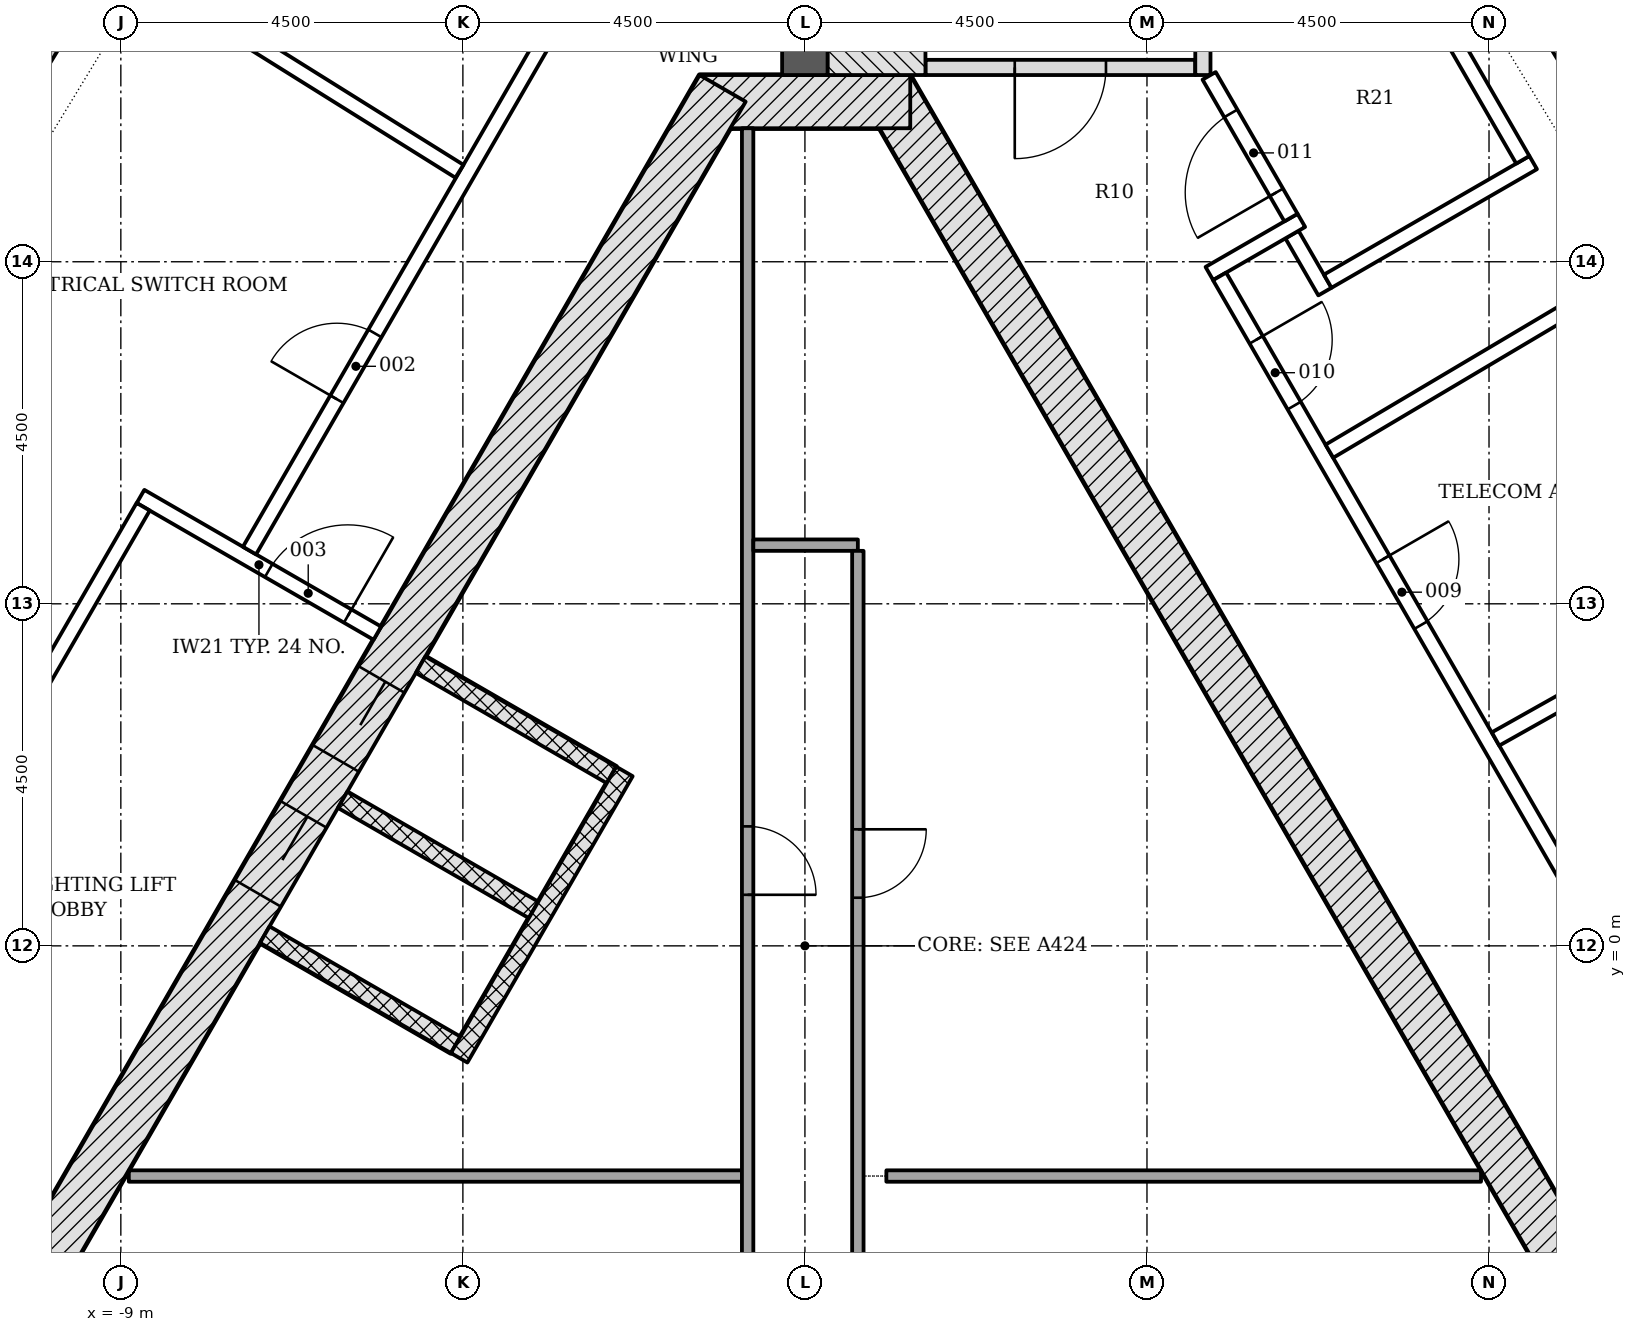
"""IFC4 building model, lengths in metres.
Left out: names, types, materials, properties, quantities, classifications, styles, units other than length and angle.
Written with IfcOpenShell. Run it as: python <this file> out.ifc"""

import sys

from ifc_helpers import new_model, si_unit, direction, frame, frame_2d, origin, place, context, subcontext, project, spatial, polyline, rectangle, outline, extrude, element, fill, save


model = new_model("IFC4")
c1 = context("Model", 3, precision=1e-05, world=origin(), true_north=direction((0.0, 1.0)))
c2 = subcontext(c1, "Body", "Model", "MODEL_VIEW")
j1 = project(units=[si_unit("LENGTHUNIT", "METRE"), si_unit("PLANEANGLEUNIT", "RADIAN")], contexts=[c1])
p1 = place(None, origin())
s1 = spatial("IfcSite", under=j1, at=p1, CompositionType="ELEMENT")
p2 = place(p1, origin())
s2 = spatial("IfcBuilding", under=s1, at=p2, CompositionType="ELEMENT")
p3 = place(p2, frame((0.0, 0.0, 302.1)))
s3 = spatial("IfcBuildingStorey", under=s2, at=p3, CompositionType="ELEMENT", Elevation=302.1)
p4 = place(p3, frame((10.311, -4.703, -0.25), z_axis=(0.0, 0.0, 1.0), x_axis=(-0.500001446645, 0.866024568562, 0.0)))
e1 = element("IfcWall", 1, at=p4, inside=s3, PredefinedType="SHEAR", context=c2, shape_type="SweptSolid", body=[
    extrude(rectangle(XDim=18.458, YDim=0.7, at=frame_2d((9.229, 0.0))), origin(), (0.0, 0.0, 1.0), 4.5),
])
p5 = place(p3, frame((1.386, 11.106, -0.25), z_axis=(0.0, 0.0, 1.0), x_axis=(-1.0, 0.0, 0.0)))
e2 = element("IfcWall", 2, at=p5, inside=s3, PredefinedType="SHEAR", context=c2, shape_type="SweptSolid", body=[
    extrude(rectangle(XDim=2.771, YDim=0.7, at=frame_2d((1.386, 0.0))), origin(), (0.0, 0.0, 1.0), 4.5),
])
p6 = place(p3, frame((-1.083, 11.281, -0.25), z_axis=(0.0, 0.0, 1.0), x_axis=(-0.500001446645, -0.866024568562, 0.0)))
e3 = element("IfcWall", 3, at=p6, inside=s3, PredefinedType="SHEAR", context=c2, shape_type="SweptSolid", body=[
    extrude(rectangle(XDim=18.458, YDim=0.7, at=frame_2d((9.229, 0.0))), origin(), (0.0, 0.0, 1.0), 4.5),
])
p7 = place(p6, frame((8.979, 0.0, 0.25)))
e4 = element("IfcOpeningElement", 4, at=p7, cuts=e3, PredefinedType="OPENING", context=c2, shape_type="SweptSolid", body=[
    extrude(rectangle(XDim=1.2, YDim=2.1, at=frame_2d((0.6, 1.05))), frame((0.0, 0.36, 0.0), z_axis=(0.0, -1.0, 0.0), x_axis=(1.0, 0.0, 0.0)), (0.0, 0.0, 1.0), 0.72),
])
p8 = place(p6, frame((11.029, 0.0, 0.25)))
e5 = element("IfcOpeningElement", 5, at=p8, cuts=e3, PredefinedType="OPENING", context=c2, shape_type="SweptSolid", body=[
    extrude(rectangle(XDim=1.2, YDim=2.1, at=frame_2d((0.6, 1.05))), frame((0.0, 0.36, 0.0), z_axis=(0.0, -1.0, 0.0), x_axis=(1.0, 0.0, 0.0)), (0.0, 0.0, 1.0), 0.72),
])
p9 = place(p3, frame((0.0, 11.456, -0.25), z_axis=(0.0, 0.0, 1.0), x_axis=(0.0, 1.0, 0.0)))
e6 = element("IfcWall", 6, at=p9, inside=s3, PredefinedType="SHEAR", context=c2, shape_type="SweptSolid", body=[
    extrude(rectangle(XDim=6.679, YDim=0.6, at=frame_2d((3.339, 0.0))), origin(), (0.0, 0.0, 1.0), 4.5),
])
p10 = place(p3, origin())
e7 = element("IfcWall", 7, at=p10, inside=s3, PredefinedType="NOTDEFINED", context=c2, shape_type="SweptSolid", body=[
    extrude(outline(polyline([(-6.901, 16.968), (-9.33, 13.179), (-11.669, 9.335), (-11.413, 9.179), (-9.075, 13.02), (-6.649, 16.806), (-6.901, 16.968)])), origin(), (0.0, 0.0, 1.0), 4.25),
])
p11 = place(p3, origin())
e8 = element("IfcWall", 8, at=p11, inside=s3, PredefinedType="NOTDEFINED", context=c2, shape_type="SweptSolid", body=[
    extrude(outline(polyline([(11.669, 9.335), (9.33, 13.179), (6.901, 16.968), (6.649, 16.806), (9.075, 13.02), (11.413, 9.179), (11.669, 9.335)])), origin(), (0.0, 0.0, 1.0), 4.25),
])
for number, where, z_axis, x_axis in (
    (9, (-5.056, 3.699, -0.25), (0.0, 0.0, 1.0), (0.866, -0.5, 0.0)),
    (10, (-6.081, 1.923, -0.25), (0.0, 0.0, 1.0), (0.866, -0.5, 0.0)),
    (11, (-7.106, 0.148, -0.25), (0.0, 0.0, 1.0), (0.866, -0.5, 0.0)),
):
    element("IfcWall", number, at=place(p3, frame(where, z_axis=z_axis, x_axis=x_axis)), inside=s3, PredefinedType="PARTITIONING", context=c2, shape_type="SweptSolid", body=[
        extrude(rectangle(XDim=2.9, YDim=0.25, at=frame_2d((1.45, 0.0))), origin(), (0.0, 0.0, 1.0), 4.5),
    ])
p12 = place(p3, frame((-2.374, 2.294, 0.0), z_axis=(0.0, 0.0, 1.0), x_axis=(-0.499996127374, -0.866027639635, 0.0)))
e12 = element("IfcWall", 12, at=p12, inside=s3, PredefinedType="PARTITIONING", context=c2, shape_type="SweptSolid", body=[
    extrude(rectangle(XDim=4.35, YDim=0.25, at=frame_2d((2.175, 0.0))), origin(), (0.0, 0.0, 1.0), 4.25),
])
p13 = place(p3, frame((-8.895, -3.028, 0.0), z_axis=(0.0, 0.0, 1.0), x_axis=(1.0, 0.0, 0.0)))
e13 = element("IfcWall", 13, at=p13, inside=s3, PredefinedType="PARTITIONING", context=c2, shape_type="SweptSolid", body=[
    extrude(rectangle(XDim=8.066, YDim=0.15, at=frame_2d((4.033, 0.0))), origin(), (0.0, 0.0, 1.0), 4.25),
])
p14 = place(p3, frame((-0.754, 10.756, 0.0), z_axis=(0.0, 0.0, 1.0), x_axis=(0.0, -1.0, 0.0)))
e14 = element("IfcWall", 14, at=p14, inside=s3, PredefinedType="PARTITIONING", context=c2, shape_type="SweptSolid", body=[
    extrude(rectangle(XDim=16.985, YDim=0.15, at=frame_2d((8.492, 0.0))), origin(), (0.0, 0.0, 1.0), 4.25),
])
p15 = place(p14, frame((9.185, 0.0, 0.0)))
e15 = element("IfcOpeningElement", 15, at=p15, cuts=e14, PredefinedType="OPENING", context=c2, shape_type="SweptSolid", body=[
    extrude(rectangle(XDim=0.9, YDim=2.1, at=frame_2d((0.45, 1.05))), frame((0.0, 0.085, 0.0), z_axis=(0.0, -1.0, 0.0), x_axis=(1.0, 0.0, 0.0)), (0.0, 0.0, 1.0), 0.17),
])
p16 = place(p3, frame((-0.679, 5.272, 0.0), z_axis=(0.0, 0.0, 1.0), x_axis=(1.0, 0.0, 0.0)))
e16 = element("IfcWall", 16, at=p16, inside=s3, PredefinedType="PARTITIONING", context=c2, shape_type="SweptSolid", body=[
    extrude(rectangle(XDim=1.375, YDim=0.15, at=frame_2d((0.688, 0.0))), origin(), (0.0, 0.0, 1.0), 4.25),
])
p17 = place(p3, frame((0.696, 5.197, 0.0), z_axis=(0.0, 0.0, 1.0), x_axis=(0.0, -1.0, 0.0)))
e17 = element("IfcWall", 17, at=p17, inside=s3, PredefinedType="PARTITIONING", context=c2, shape_type="SweptSolid", body=[
    extrude(rectangle(XDim=11.425, YDim=0.15, at=frame_2d((5.712, 0.0))), origin(), (0.0, 0.0, 1.0), 4.25),
])
p18 = place(p17, frame((3.664, 0.0, 0.0)))
e18 = element("IfcOpeningElement", 18, at=p18, cuts=e17, PredefinedType="OPENING", context=c2, shape_type="SweptSolid", body=[
    extrude(rectangle(XDim=0.9, YDim=2.1, at=frame_2d((0.45, 1.05))), frame((0.0, 0.085, 0.0), z_axis=(0.0, -1.0, 0.0), x_axis=(1.0, 0.0, 0.0)), (0.0, 0.0, 1.0), 0.17),
])
p19 = place(p3, frame((1.071, -3.028, 0.0), z_axis=(0.0, 0.0, 1.0), x_axis=(1.0, 0.0, 0.0)))
e19 = element("IfcWall", 19, at=p19, inside=s3, PredefinedType="PARTITIONING", context=c2, shape_type="SweptSolid", body=[
    extrude(rectangle(XDim=7.824, YDim=0.15, at=frame_2d((3.912, 0.0))), origin(), (0.0, 0.0, 1.0), 4.25),
])
p20 = place(p3, frame((5.135, 11.556, -0.25), z_axis=(0.0, 0.0, 1.0), x_axis=(-1.0, 0.0, 0.0)))
e20 = element("IfcWall", 20, at=p20, inside=s3, PredefinedType="SHEAR", context=c2, shape_type="SweptSolid", body=[
    extrude(rectangle(XDim=3.55, YDim=0.2, at=frame_2d((1.775, 0.0))), origin(), (0.0, 0.0, 1.0), 4.5),
])
p21 = place(p20, frame((1.175, 0.0, 0.25)))
e21 = element("IfcOpeningElement", 21, at=p21, cuts=e20, PredefinedType="OPENING", context=c2, shape_type="SweptSolid", body=[
    extrude(rectangle(XDim=1.2, YDim=2.1, at=frame_2d((0.6, 1.05))), frame((0.0, 0.11, 0.0), z_axis=(0.0, -1.0, 0.0), x_axis=(1.0, 0.0, 0.0)), (0.0, 0.0, 1.0), 0.22),
])
p22 = place(p3, frame((5.236, 11.456, -0.25), z_axis=(0.0, 0.0, 1.0), x_axis=(0.0, 1.0, 0.0)))
e22 = element("IfcWall", 22, at=p22, inside=s3, PredefinedType="SHEAR", context=c2, shape_type="SweptSolid", body=[
    extrude(rectangle(XDim=5.6, YDim=0.2, at=frame_2d((2.8, 0.0))), origin(), (0.0, 0.0, 1.0), 4.5),
])
p23 = place(p22, frame((0.45, 0.0, 0.25)))
e23 = element("IfcOpeningElement", 23, at=p23, cuts=e22, PredefinedType="OPENING", context=c2, shape_type="SweptSolid", body=[
    extrude(rectangle(XDim=1.2, YDim=2.1, at=frame_2d((0.6, 1.05))), frame((0.0, 0.11, 0.0), z_axis=(0.0, -1.0, 0.0), x_axis=(1.0, 0.0, 0.0)), (0.0, 0.0, 1.0), 0.22),
])
p24 = place(p3, frame((0.943, 11.456, -0.25), z_axis=(0.0, 0.0, 1.0), x_axis=(0.0, 1.0, 0.0)))
e24 = element("IfcWall", 24, at=p24, inside=s3, PredefinedType="SHEAR", context=c2, shape_type="SweptSolid", body=[
    extrude(rectangle(XDim=6.679, YDim=1.286, at=frame_2d((3.339, 0.0))), origin(), (0.0, 0.0, 1.0), 4.5),
])
p25 = place(p3, frame((-8.741, 5.913, 0.0), z_axis=(0.0, 0.0, 1.0), x_axis=(0.866017220491, -0.500014173611, 0.0)))
e25 = element("IfcWall", 25, at=p25, inside=s3, PredefinedType="PARTITIONING", context=c2, shape_type="SweptSolid", body=[
    extrude(rectangle(XDim=3.598, YDim=0.2, at=frame_2d((1.799, 0.0))), origin(), (0.0, 0.0, 1.0), 4.25),
])
p26 = place(p25, frame((1.948, 0.0, 0.0)))
e26 = element("IfcOpeningElement", 26, at=p26, cuts=e25, PredefinedType="OPENING", context=c2, shape_type="SweptSolid", body=[
    extrude(rectangle(XDim=1.2, YDim=2.1, at=frame_2d((0.6, 1.05))), frame((0.0, 0.11, 0.0), z_axis=(0.0, -1.0, 0.0), x_axis=(1.0, 0.0, 0.0)), (0.0, 0.0, 1.0), 0.22),
])
p27 = place(p3, frame((-12.658, -1.068, 0.0), z_axis=(0.0, 0.0, 1.0), x_axis=(0.499996073327, 0.866027670838, 0.0)))
e27 = element("IfcWall", 27, at=p27, inside=s3, PredefinedType="PARTITIONING", context=c2, shape_type="SweptSolid", body=[
    extrude(rectangle(XDim=7.904, YDim=0.2, at=frame_2d((3.952, 0.0))), origin(), (0.0, 0.0, 1.0), 3.702),
])
p28 = place(p27, frame((0.541, 0.0, 0.0)))
e28 = element("IfcOpeningElement", 28, at=p28, cuts=e27, PredefinedType="OPENING", context=c2, shape_type="SweptSolid", body=[
    extrude(rectangle(XDim=1.2, YDim=2.1, at=frame_2d((0.6, 1.05))), frame((0.0, 0.11, 0.0), z_axis=(0.0, -1.0, 0.0), x_axis=(1.0, 0.0, 0.0)), (0.0, 0.0, 1.0), 0.22),
])
p29 = place(p3, frame((-7.307, 5.2, 0.0), z_axis=(0.0, 0.0, 1.0), x_axis=(0.49999780173, 0.866026672953, 0.0)))
e29 = element("IfcWall", 29, at=p29, inside=s3, PredefinedType="PARTITIONING", context=c2, shape_type="SweptSolid", body=[
    extrude(rectangle(XDim=13.841, YDim=0.2, at=frame_2d((6.92, 0.0))), origin(), (0.0, 0.0, 1.0), 3.702),
])
p30 = place(p29, frame((9.457, 0.0, 0.0)))
e30 = element("IfcOpeningElement", 30, at=p30, cuts=e29, PredefinedType="OPENING", context=c2, shape_type="SweptSolid", body=[
    extrude(rectangle(XDim=1.0, YDim=2.1, at=frame_2d((0.5, 1.05))), frame((0.0, 0.11, 0.0), z_axis=(0.0, -1.0, 0.0), x_axis=(1.0, 0.0, 0.0)), (0.0, 0.0, 1.0), 0.22),
])
p31 = place(p29, frame((2.299, 0.0, 0.0)))
e31 = element("IfcOpeningElement", 31, at=p31, cuts=e29, PredefinedType="OPENING", context=c2, shape_type="SweptSolid", body=[
    extrude(rectangle(XDim=1.0, YDim=2.1, at=frame_2d((0.5, 1.05))), frame((0.0, 0.11, 0.0), z_axis=(0.0, -1.0, 0.0), x_axis=(1.0, 0.0, 0.0)), (0.0, 0.0, 1.0), 0.22),
])
p32 = place(p3, frame((-8.736, 12.808, 0.0), z_axis=(0.0, 0.0, 1.0), x_axis=(0.848106554737, -0.529825699463, 0.0)))
e32 = element("IfcWall", 32, at=p32, inside=s3, PredefinedType="PARTITIONING", context=c2, shape_type="SweptSolid", body=[
    extrude(rectangle(XDim=4.941, YDim=0.2, at=frame_2d((2.47, 0.0))), origin(), (0.0, 0.0, 1.0), 3.702),
])
p33 = place(p3, frame((6.408, 9.358, 0.0), z_axis=(0.0, 0.0, 1.0), x_axis=(0.499958279983, -0.866049489508, 0.0)))
e33 = element("IfcWall", 33, at=p33, inside=s3, PredefinedType="PARTITIONING", context=c2, shape_type="SweptSolid", body=[
    extrude(rectangle(XDim=0.866, YDim=0.2, at=frame_2d((0.433, 0.0))), origin(), (0.0, 0.0, 1.0), 4.25),
])
p34 = place(p3, frame((5.32, 8.845, 0.0), z_axis=(0.0, 0.0, 1.0), x_axis=(0.866031452229, 0.49998952364, 0.0)))
e34 = element("IfcWall", 34, at=p34, inside=s3, PredefinedType="PARTITIONING", context=c2, shape_type="SweptSolid", body=[
    extrude(rectangle(XDim=1.398, YDim=0.2, at=frame_2d((0.699, 0.0))), origin(), (0.0, 0.0, 1.0), 4.25),
])
p35 = place(p3, frame((6.395, 9.581, 0.0), z_axis=(0.0, 0.0, 1.0), x_axis=(-0.500003735859, 0.866023246874, 0.0)))
e35 = element("IfcWall", 35, at=p35, inside=s3, PredefinedType="PARTITIONING", context=c2, shape_type="SweptSolid", body=[
    extrude(rectangle(XDim=2.154, YDim=0.2, at=frame_2d((1.077, 0.0))), origin(), (0.0, 0.0, 1.0), 3.702),
])
p36 = place(p35, frame((0.383, 0.0, 0.0)))
e36 = element("IfcOpeningElement", 36, at=p36, cuts=e35, PredefinedType="OPENING", context=c2, shape_type="SweptSolid", body=[
    extrude(rectangle(XDim=1.2, YDim=2.1, at=frame_2d((0.6, 1.05))), frame((0.0, 0.11, 0.0), z_axis=(0.0, -1.0, 0.0), x_axis=(1.0, 0.0, 0.0)), (0.0, 0.0, 1.0), 0.22),
])
p37 = place(p3, frame((5.455, 8.808, 0.0), z_axis=(0.0, 0.0, 1.0), x_axis=(0.499996641012, -0.866027343088, 0.0)))
e37 = element("IfcWall", 37, at=p37, inside=s3, PredefinedType="PARTITIONING", context=c2, shape_type="SweptSolid", body=[
    extrude(rectangle(XDim=19.937, YDim=0.2, at=frame_2d((9.969, 0.0))), origin(), (0.0, 0.0, 1.0), 3.702),
])
p38 = place(p37, frame((13.097, 0.0, 0.0)))
e38 = element("IfcOpeningElement", 38, at=p38, cuts=e37, PredefinedType="OPENING", context=c2, shape_type="SweptSolid", body=[
    extrude(rectangle(XDim=1.0, YDim=2.1, at=frame_2d((0.5, 1.05))), frame((0.0, 0.11, 0.0), z_axis=(0.0, -1.0, 0.0), x_axis=(1.0, 0.0, 0.0)), (0.0, 0.0, 1.0), 0.22),
])
p39 = place(p37, frame((4.297, 0.0, 0.0)))
e39 = element("IfcOpeningElement", 39, at=p39, cuts=e37, PredefinedType="OPENING", context=c2, shape_type="SweptSolid", body=[
    extrude(rectangle(XDim=1.0, YDim=2.1, at=frame_2d((0.5, 1.05))), frame((0.0, 0.11, 0.0), z_axis=(0.0, -1.0, 0.0), x_axis=(1.0, 0.0, 0.0)), (0.0, 0.0, 1.0), 0.22),
])
p40 = place(p37, frame((0.963, 0.0, 0.0)))
e40 = element("IfcOpeningElement", 40, at=p40, cuts=e37, PredefinedType="OPENING", context=c2, shape_type="SweptSolid", body=[
    extrude(rectangle(XDim=1.0, YDim=2.1, at=frame_2d((0.5, 1.05))), frame((0.0, 0.11, 0.0), z_axis=(0.0, -1.0, 0.0), x_axis=(1.0, 0.0, 0.0)), (0.0, 0.0, 1.0), 0.22),
])
p41 = place(p3, frame((9.086, 2.722, 0.0), z_axis=(0.0, 0.0, 1.0), x_axis=(0.87175044705, 0.489950158759, 0.0)))
e41 = element("IfcWall", 41, at=p41, inside=s3, PredefinedType="PARTITIONING", context=c2, shape_type="SweptSolid", body=[
    extrude(rectangle(XDim=4.844, YDim=0.2, at=frame_2d((2.422, 0.0))), origin(), (0.0, 0.0, 1.0), 3.702),
])
p42 = place(p3, frame((6.9, 6.508, 0.0), z_axis=(0.0, 0.0, 1.0), x_axis=(0.860180185222, 0.509990243977, 0.0)))
e42 = element("IfcWall", 42, at=p42, inside=s3, PredefinedType="PARTITIONING", context=c2, shape_type="SweptSolid", body=[
    extrude(rectangle(XDim=4.845, YDim=0.2, at=frame_2d((2.422, 0.0))), origin(), (0.0, 0.0, 1.0), 3.702),
])
p43 = place(p3, frame((6.878, 8.744, 0.0), z_axis=(0.0, 0.0, 1.0), x_axis=(0.866025387892, 0.500000027526, 0.0)))
e43 = element("IfcWall", 43, at=p43, inside=s3, PredefinedType="PARTITIONING", context=c2, shape_type="SweptSolid", body=[
    extrude(rectangle(XDim=3.122, YDim=0.2, at=frame_2d((1.561, 0.0))), origin(), (0.0, 0.0, 1.0), 4.25),
])
p44 = place(p3, frame((9.445, 10.341, 0.0), z_axis=(0.0, 0.0, 1.0), x_axis=(-0.499996461177, 0.866027446915, 0.0)))
e44 = element("IfcWall", 44, at=p44, inside=s3, PredefinedType="PARTITIONING", context=c2, shape_type="SweptSolid", body=[
    extrude(rectangle(XDim=5.759, YDim=0.2, at=frame_2d((2.879, 0.0))), origin(), (0.0, 0.0, 1.0), 3.702),
])
p45 = place(p7, origin())
e45 = element("IfcDoor", 45, at=p45, inside=s3, OperationType="DOUBLE_DOOR_SLIDING", PredefinedType="DOOR", context=c2, shape_type="SweptSolid", body=[
    extrude(rectangle(XDim=1.2, YDim=2.1, at=frame_2d((0.6, 1.05))), frame((0.0, 0.025, 0.0), z_axis=(0.0, -1.0, 0.0), x_axis=(1.0, 0.0, 0.0)), (0.0, 0.0, 1.0), 0.05),
])
fill(e4, e45)
p46 = place(p8, origin())
e46 = element("IfcDoor", 46, at=p46, inside=s3, OperationType="DOUBLE_DOOR_SLIDING", PredefinedType="DOOR", context=c2, shape_type="SweptSolid", body=[
    extrude(rectangle(XDim=1.2, YDim=2.1, at=frame_2d((0.6, 1.05))), frame((0.0, 0.025, 0.0), z_axis=(0.0, -1.0, 0.0), x_axis=(1.0, 0.0, 0.0)), (0.0, 0.0, 1.0), 0.05),
])
fill(e5, e46)
p47 = place(p15, origin())
e47 = element("IfcDoor", 47, at=p47, inside=s3, OperationType="SINGLE_SWING_RIGHT", PredefinedType="DOOR", context=c2, shape_type="SweptSolid", body=[
    extrude(rectangle(XDim=0.9, YDim=2.1, at=frame_2d((0.45, 1.05))), frame((0.0, 0.025, 0.0), z_axis=(0.0, -1.0, 0.0), x_axis=(1.0, 0.0, 0.0)), (0.0, 0.0, 1.0), 0.05),
])
fill(e15, e47)
p48 = place(p18, origin())
e48 = element("IfcDoor", 48, at=p48, inside=s3, OperationType="SINGLE_SWING_LEFT", PredefinedType="DOOR", context=c2, shape_type="SweptSolid", body=[
    extrude(rectangle(XDim=0.9, YDim=2.1, at=frame_2d((0.45, 1.05))), frame((0.0, 0.025, 0.0), z_axis=(0.0, -1.0, 0.0), x_axis=(1.0, 0.0, 0.0)), (0.0, 0.0, 1.0), 0.05),
])
fill(e18, e48)
p49 = place(p21, origin())
e49 = element("IfcDoor", 49, at=p49, inside=s3, OperationType="SINGLE_SWING_RIGHT", PredefinedType="DOOR", context=c2, shape_type="SweptSolid", body=[
    extrude(rectangle(XDim=1.2, YDim=2.1, at=frame_2d((0.6, 1.05))), frame((0.0, 0.025, 0.0), z_axis=(0.0, -1.0, 0.0), x_axis=(1.0, 0.0, 0.0)), (0.0, 0.0, 1.0), 0.05),
])
fill(e21, e49)
p50 = place(p31, origin())
e50 = element("IfcDoor", 50, at=p50, inside=s3, OperationType="SINGLE_SWING_LEFT", PredefinedType="DOOR", context=c2, shape_type="SweptSolid", body=[
    extrude(rectangle(XDim=1.0, YDim=2.1, at=frame_2d((0.5, 1.05))), frame((0.0, 0.025, 0.0), z_axis=(0.0, -1.0, 0.0), x_axis=(1.0, 0.0, 0.0)), (0.0, 0.0, 1.0), 0.05),
])
fill(e31, e50)
p51 = place(p26, origin())
e51 = element("IfcDoor", 51, at=p51, inside=s3, OperationType="SINGLE_SWING_RIGHT", PredefinedType="DOOR", context=c2, shape_type="SweptSolid", body=[
    extrude(rectangle(XDim=1.2, YDim=2.1, at=frame_2d((0.6, 1.05))), frame((0.0, 0.025, 0.0), z_axis=(0.0, -1.0, 0.0), x_axis=(1.0, 0.0, 0.0)), (0.0, 0.0, 1.0), 0.05),
])
fill(e26, e51)
p52 = place(p39, origin())
e52 = element("IfcDoor", 52, at=p52, inside=s3, OperationType="SINGLE_SWING_LEFT", PredefinedType="DOOR", context=c2, shape_type="SweptSolid", body=[
    extrude(rectangle(XDim=1.0, YDim=2.1, at=frame_2d((0.5, 1.05))), frame((0.0, 0.025, 0.0), z_axis=(0.0, -1.0, 0.0), x_axis=(1.0, 0.0, 0.0)), (0.0, 0.0, 1.0), 0.05),
])
fill(e39, e52)
p53 = place(p40, origin())
e53 = element("IfcDoor", 53, at=p53, inside=s3, OperationType="SINGLE_SWING_LEFT", PredefinedType="DOOR", context=c2, shape_type="SweptSolid", body=[
    extrude(rectangle(XDim=1.0, YDim=2.1, at=frame_2d((0.5, 1.05))), frame((0.0, 0.025, 0.0), z_axis=(0.0, -1.0, 0.0), x_axis=(1.0, 0.0, 0.0)), (0.0, 0.0, 1.0), 0.05),
])
fill(e40, e53)
p54 = place(p36, origin())
e54 = element("IfcDoor", 54, at=p54, inside=s3, OperationType="SINGLE_SWING_LEFT", PredefinedType="DOOR", context=c2, shape_type="SweptSolid", body=[
    extrude(rectangle(XDim=1.2, YDim=2.1, at=frame_2d((0.6, 1.05))), frame((0.0, 0.025, 0.0), z_axis=(0.0, -1.0, 0.0), x_axis=(1.0, 0.0, 0.0)), (0.0, 0.0, 1.0), 0.05),
])
fill(e36, e54)
save(model, sys.argv[1])
